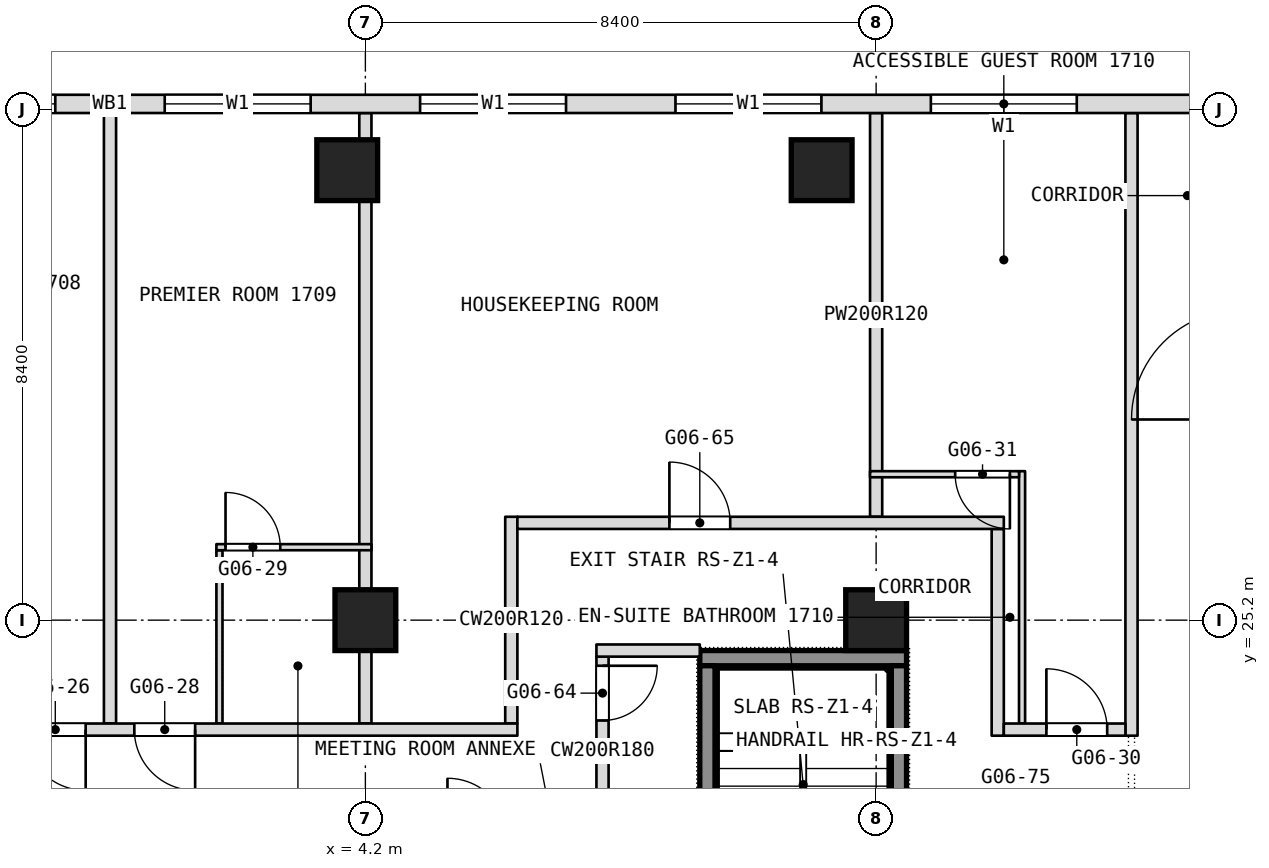
"""IFC4 building model, lengths in metres.
Left out: names, types, materials, properties, quantities, classifications, styles, units other than length and angle.
Written with IfcOpenShell. Run it as: python <this file> out.ifc"""

import sys

from ifc_helpers import new_model, si_unit, direction, frame, frame_2d, origin, origin_2d, place, context, subcontext, project, spatial, rectangle, extrude, element, fill, save


model = new_model("IFC4")
c1 = context("Model", 3, precision=1e-05, world=origin(), true_north=direction((0.0, 1.0)))
c2 = subcontext(c1, "Body", "Model", "MODEL_VIEW")
j1 = project(units=[si_unit("LENGTHUNIT", "METRE"), si_unit("PLANEANGLEUNIT", "RADIAN")], contexts=[c1])
p1 = place(None, origin())
s1 = spatial("IfcSite", under=j1, at=p1, CompositionType="ELEMENT")
p2 = place(p1, origin())
s2 = spatial("IfcBuilding", under=s1, at=p2, CompositionType="ELEMENT")
p3 = place(p2, frame((0.0, 0.0, 76.1)))
s3 = spatial("IfcBuildingStorey", under=s2, at=p3, CompositionType="ELEMENT", Elevation=76.1)
for number, where, z_axis, x_axis in (
    (1, (4.2, 25.2, 0.0), (0.0, 0.0, 1.0), (1.0, 0.0, 0.0)),
    (2, (12.6, 25.2, 0.0), (0.0, 0.0, 1.0), (1.0, 0.0, 0.0)),
    (3, (3.901, 32.6, 0.0), (0.0, 0.0, 1.0), (1.0, 0.0, 0.0)),
    (4, (11.704, 32.6, 0.0), (0.0, 0.0, 1.0), (1.0, 0.0, 0.0)),
):
    element("IfcColumn", number, at=place(p3, frame(where, z_axis=z_axis, x_axis=x_axis)), inside=s3, PredefinedType="COLUMN", context=c2, shape_type="SweptSolid", body=[
        extrude(rectangle(XDim=1.0, YDim=1.0, at=origin_2d()), origin(), (0.0, 0.0, 1.0), 3.6),
    ])
p4 = place(p3, frame((16.8, 23.3, 0.0), z_axis=(0.0, 0.0, 1.0), x_axis=(0.0, 1.0, 0.0)))
e5 = element("IfcWall", 5, at=p4, inside=s3, PredefinedType="PARTITIONING", context=c2, shape_type="SweptSolid", body=[
    extrude(rectangle(XDim=10.24, YDim=0.2, at=frame_2d((5.12, 0.0))), origin(), (0.0, 0.0, 1.0), 3.34),
])
p5 = place(p3, frame((15.0, 23.5, 0.0), z_axis=(0.0, 0.0, 1.0), x_axis=(0.0, 1.0, 0.0)))
e6 = element("IfcWall", 6, at=p5, inside=s3, PredefinedType="PARTITIONING", context=c2, shape_type="SweptSolid", body=[
    extrude(rectangle(XDim=4.15, YDim=0.1, at=frame_2d((2.075, 0.0))), origin(), (0.0, 0.0, 1.0), 3.34),
])
p6 = place(p3, frame((14.6, 23.3, 0.0), z_axis=(0.0, 0.0, 1.0), x_axis=(0.0, 1.0, 0.0)))
e7 = element("IfcWall", 7, at=p6, inside=s3, PredefinedType="PARTITIONING", context=c2, shape_type="SweptSolid", body=[
    extrude(rectangle(XDim=3.4, YDim=0.2, at=frame_2d((1.7, 0.0))), origin(), (0.0, 0.0, 1.0), 3.34),
])
p7 = place(p3, frame((12.6, 26.9, 0.0), z_axis=(0.0, 0.0, 1.0), x_axis=(0.0, 1.0, 0.0)))
e8 = element("IfcWall", 8, at=p7, inside=s3, PredefinedType="PARTITIONING", context=c2, shape_type="SweptSolid", body=[
    extrude(rectangle(XDim=6.64, YDim=0.2, at=frame_2d((3.32, 0.0))), origin(), (0.0, 0.0, 1.0), 3.34),
])
p8 = place(p3, frame((8.1, 21.5, 0.0), z_axis=(0.0, 0.0, 1.0), x_axis=(0.0, 1.0, 0.0)))
e9 = element("IfcWall", 9, at=p8, inside=s3, PredefinedType="PARTITIONING", context=c2, shape_type="SweptSolid", body=[
    extrude(rectangle(XDim=3.1, YDim=0.2, at=frame_2d((1.55, 0.0))), origin(), (0.0, 0.0, 1.0), 3.34),
])
p9 = place(p8, frame((2.05, 0.0, 0.0)))
e10 = element("IfcOpeningElement", 10, at=p9, cuts=e9, PredefinedType="OPENING", context=c2, shape_type="SweptSolid", body=[
    extrude(rectangle(XDim=0.9, YDim=2.1, at=frame_2d((0.45, 1.05))), frame((0.0, 0.1, 0.0), z_axis=(0.0, -1.0, 0.0), x_axis=(1.0, 0.0, 0.0)), (0.0, 0.0, 1.0), 0.2),
])
p10 = place(p3, frame((6.6, 23.5, 0.0), z_axis=(0.0, 0.0, 1.0), x_axis=(0.0, 1.0, 0.0)))
e11 = element("IfcWall", 11, at=p10, inside=s3, PredefinedType="PARTITIONING", context=c2, shape_type="SweptSolid", body=[
    extrude(rectangle(XDim=3.4, YDim=0.2, at=frame_2d((1.7, 0.0))), origin(), (0.0, 0.0, 1.0), 3.34),
])
p11 = place(p3, frame((4.2, 23.5, 0.0), z_axis=(0.0, 0.0, 1.0), x_axis=(0.0, 1.0, 0.0)))
e12 = element("IfcWall", 12, at=p11, inside=s3, PredefinedType="PARTITIONING", context=c2, shape_type="SweptSolid", body=[
    extrude(rectangle(XDim=10.04, YDim=0.2, at=frame_2d((5.02, 0.0))), origin(), (0.0, 0.0, 1.0), 3.34),
])
p12 = place(p3, frame((1.8, 23.5, 0.0), z_axis=(0.0, 0.0, 1.0), x_axis=(0.0, 1.0, 0.0)))
e13 = element("IfcWall", 13, at=p12, inside=s3, PredefinedType="PARTITIONING", context=c2, shape_type="SweptSolid", body=[
    extrude(rectangle(XDim=2.85, YDim=0.1, at=frame_2d((1.425, 0.0))), origin(), (0.0, 0.0, 1.0), 3.34),
])
p13 = place(p3, frame((0.0, 23.5, 0.0), z_axis=(0.0, 0.0, 1.0), x_axis=(0.0, 1.0, 0.0)))
e14 = element("IfcWall", 14, at=p13, inside=s3, PredefinedType="PARTITIONING", context=c2, shape_type="SweptSolid", body=[
    extrude(rectangle(XDim=10.04, YDim=0.2, at=frame_2d((5.02, 0.0))), origin(), (0.0, 0.0, 1.0), 3.34),
])
p14 = place(p3, frame((-16.7, 23.4, 0.0), z_axis=(0.0, 0.0, 1.0), x_axis=(1.0, 0.0, 0.0)))
e15 = element("IfcWall", 15, at=p14, inside=s3, PredefinedType="PARTITIONING", context=c2, shape_type="SweptSolid", body=[
    extrude(rectangle(XDim=23.4, YDim=0.2, at=frame_2d((11.7, 0.0))), origin(), (0.0, 0.0, 1.0), 3.34),
])
p15 = place(p14, frame((2.4, 0.0, 0.0)))
e16 = element("IfcOpeningElement", 16, at=p15, cuts=e15, PredefinedType="OPENING", context=c2, shape_type="SweptSolid", body=[
    extrude(rectangle(XDim=0.9, YDim=2.1, at=frame_2d((0.45, 1.05))), frame((0.0, 0.1, 0.0), z_axis=(0.0, -1.0, 0.0), x_axis=(1.0, 0.0, 0.0)), (0.0, 0.0, 1.0), 0.2),
])
p16 = place(p14, frame((5.65, 0.0, 0.0)))
e17 = element("IfcOpeningElement", 17, at=p16, cuts=e15, PredefinedType="OPENING", context=c2, shape_type="SweptSolid", body=[
    extrude(rectangle(XDim=1.1, YDim=2.1, at=frame_2d((0.55, 1.05))), frame((0.0, 0.1, 0.0), z_axis=(0.0, -1.0, 0.0), x_axis=(1.0, 0.0, 0.0)), (0.0, 0.0, 1.0), 0.2),
])
p17 = place(p14, frame((15.3, 0.0, 0.0)))
e18 = element("IfcOpeningElement", 18, at=p17, cuts=e15, PredefinedType="OPENING", context=c2, shape_type="SweptSolid", body=[
    extrude(rectangle(XDim=1.0, YDim=2.1, at=frame_2d((0.5, 1.05))), frame((0.0, 0.1, 0.0), z_axis=(0.0, -1.0, 0.0), x_axis=(1.0, 0.0, 0.0)), (0.0, 0.0, 1.0), 0.2),
])
p18 = place(p14, frame((17.1, 0.0, 0.0)))
e19 = element("IfcOpeningElement", 19, at=p18, cuts=e15, PredefinedType="OPENING", context=c2, shape_type="SweptSolid", body=[
    extrude(rectangle(XDim=1.0, YDim=2.1, at=frame_2d((0.5, 1.05))), frame((0.0, 0.1, 0.0), z_axis=(0.0, -1.0, 0.0), x_axis=(1.0, 0.0, 0.0)), (0.0, 0.0, 1.0), 0.2),
])
p19 = place(p3, frame((14.7, 23.4, 0.0), z_axis=(0.0, 0.0, 1.0), x_axis=(1.0, 0.0, 0.0)))
e20 = element("IfcWall", 20, at=p19, inside=s3, PredefinedType="PARTITIONING", context=c2, shape_type="SweptSolid", body=[
    extrude(rectangle(XDim=2.0, YDim=0.2, at=frame_2d((1.0, 0.0))), origin(), (0.0, 0.0, 1.0), 3.34),
])
p20 = place(p19, frame((0.7, 0.0, 0.0)))
e21 = element("IfcOpeningElement", 21, at=p20, cuts=e20, PredefinedType="OPENING", context=c2, shape_type="SweptSolid", body=[
    extrude(rectangle(XDim=1.0, YDim=2.1, at=frame_2d((0.5, 1.05))), frame((0.0, 0.1, 0.0), z_axis=(0.0, -1.0, 0.0), x_axis=(1.0, 0.0, 0.0)), (0.0, 0.0, 1.0), 0.2),
])
p21 = place(p3, frame((8.0, 24.7, 0.0), z_axis=(0.0, 0.0, 1.0), x_axis=(1.0, 0.0, 0.0)))
e22 = element("IfcWall", 22, at=p21, inside=s3, PredefinedType="PARTITIONING", context=c2, shape_type="SweptSolid", body=[
    extrude(rectangle(XDim=1.7, YDim=0.2, at=frame_2d((0.85, 0.0))), origin(), (0.0, 0.0, 1.0), 3.34),
])
p22 = place(p3, frame((1.75, 26.4, 0.0), z_axis=(0.0, 0.0, 1.0), x_axis=(1.0, 0.0, 0.0)))
e23 = element("IfcWall", 23, at=p22, inside=s3, PredefinedType="PARTITIONING", context=c2, shape_type="SweptSolid", body=[
    extrude(rectangle(XDim=2.55, YDim=0.1, at=frame_2d((1.275, 0.0))), origin(), (0.0, 0.0, 1.0), 3.34),
])
p23 = place(p22, frame((0.15, 0.0, 0.0)))
e24 = element("IfcOpeningElement", 24, at=p23, cuts=e23, PredefinedType="OPENING", context=c2, shape_type="SweptSolid", body=[
    extrude(rectangle(XDim=0.9, YDim=2.1, at=frame_2d((0.45, 1.05))), frame((0.0, 0.05, 0.0), z_axis=(0.0, -1.0, 0.0), x_axis=(1.0, 0.0, 0.0)), (0.0, 0.0, 1.0), 0.1),
])
p24 = place(p3, frame((6.7, 26.8, 0.0), z_axis=(0.0, 0.0, 1.0), x_axis=(1.0, 0.0, 0.0)))
e25 = element("IfcWall", 25, at=p24, inside=s3, PredefinedType="PARTITIONING", context=c2, shape_type="SweptSolid", body=[
    extrude(rectangle(XDim=8.0, YDim=0.2, at=frame_2d((4.0, 0.0))), origin(), (0.0, 0.0, 1.0), 3.34),
])
p25 = place(p24, frame((2.5, 0.0, 0.0)))
e26 = element("IfcOpeningElement", 26, at=p25, cuts=e25, PredefinedType="OPENING", context=c2, shape_type="SweptSolid", body=[
    extrude(rectangle(XDim=1.0, YDim=2.1, at=frame_2d((0.5, 1.05))), frame((0.0, 0.1, 0.0), z_axis=(0.0, -1.0, 0.0), x_axis=(1.0, 0.0, 0.0)), (0.0, 0.0, 1.0), 0.2),
])
p26 = place(p3, frame((12.5, 27.6, 0.0), z_axis=(0.0, 0.0, 1.0), x_axis=(1.0, 0.0, 0.0)))
e27 = element("IfcWall", 27, at=p26, inside=s3, PredefinedType="PARTITIONING", context=c2, shape_type="SweptSolid", body=[
    extrude(rectangle(XDim=2.45, YDim=0.1, at=frame_2d((1.225, 0.0))), origin(), (0.0, 0.0, 1.0), 3.34),
])
p27 = place(p26, frame((1.4, 0.0, 0.0)))
e28 = element("IfcOpeningElement", 28, at=p27, cuts=e27, PredefinedType="OPENING", context=c2, shape_type="SweptSolid", body=[
    extrude(rectangle(XDim=0.9, YDim=2.1, at=frame_2d((0.45, 1.05))), frame((0.0, 0.05, 0.0), z_axis=(0.0, -1.0, 0.0), x_axis=(1.0, 0.0, 0.0)), (0.0, 0.0, 1.0), 0.1),
])
p28 = place(p3, frame((23.406, 33.69, 0.0), z_axis=(0.0, 0.0, 1.0), x_axis=(-1.0, 0.0, 0.0)))
e29 = element("IfcWall", 29, at=p28, inside=s3, PredefinedType="NOTDEFINED", context=c2, shape_type="SweptSolid", body=[
    extrude(rectangle(XDim=46.812, YDim=0.3, at=frame_2d((23.406, 0.0))), origin(), (0.0, 0.0, 1.0), 3.6),
])
p29 = place(p28, frame((2.186, 0.0, 0.9)))
e30 = element("IfcOpeningElement", 30, at=p29, cuts=e29, PredefinedType="OPENING", context=c2, shape_type="SweptSolid", body=[
    extrude(rectangle(XDim=2.4, YDim=2.1, at=frame_2d((1.2, 1.05))), frame((0.0, 0.15, 0.0), z_axis=(0.0, -1.0, 0.0), x_axis=(1.0, 0.0, 0.0)), (0.0, 0.0, 1.0), 0.3),
])
p30 = place(p28, frame((7.506, 0.0, 0.9)))
e31 = element("IfcOpeningElement", 31, at=p30, cuts=e29, PredefinedType="OPENING", context=c2, shape_type="SweptSolid", body=[
    extrude(rectangle(XDim=2.4, YDim=2.1, at=frame_2d((1.2, 1.05))), frame((0.0, 0.15, 0.0), z_axis=(0.0, -1.0, 0.0), x_axis=(1.0, 0.0, 0.0)), (0.0, 0.0, 1.0), 0.3),
])
p31 = place(p28, frame((11.706, 0.0, 0.9)))
e32 = element("IfcOpeningElement", 32, at=p31, cuts=e29, PredefinedType="OPENING", context=c2, shape_type="SweptSolid", body=[
    extrude(rectangle(XDim=2.4, YDim=2.1, at=frame_2d((1.2, 1.05))), frame((0.0, 0.15, 0.0), z_axis=(0.0, -1.0, 0.0), x_axis=(1.0, 0.0, 0.0)), (0.0, 0.0, 1.0), 0.3),
])
p32 = place(p28, frame((15.906, 0.0, 0.9)))
e33 = element("IfcOpeningElement", 33, at=p32, cuts=e29, PredefinedType="OPENING", context=c2, shape_type="SweptSolid", body=[
    extrude(rectangle(XDim=2.4, YDim=2.1, at=frame_2d((1.2, 1.05))), frame((0.0, 0.15, 0.0), z_axis=(0.0, -1.0, 0.0), x_axis=(1.0, 0.0, 0.0)), (0.0, 0.0, 1.0), 0.3),
])
p33 = place(p28, frame((20.106, 0.0, 0.9)))
e34 = element("IfcOpeningElement", 34, at=p33, cuts=e29, PredefinedType="OPENING", context=c2, shape_type="SweptSolid", body=[
    extrude(rectangle(XDim=2.4, YDim=2.1, at=frame_2d((1.2, 1.05))), frame((0.0, 0.15, 0.0), z_axis=(0.0, -1.0, 0.0), x_axis=(1.0, 0.0, 0.0)), (0.0, 0.0, 1.0), 0.3),
])
p34 = place(p28, frame((24.306, 0.0, 0.9)))
e35 = element("IfcOpeningElement", 35, at=p34, cuts=e29, PredefinedType="OPENING", context=c2, shape_type="SweptSolid", body=[
    extrude(rectangle(XDim=2.4, YDim=2.1, at=frame_2d((1.2, 1.05))), frame((0.0, 0.15, 0.0), z_axis=(0.0, -1.0, 0.0), x_axis=(1.0, 0.0, 0.0)), (0.0, 0.0, 1.0), 0.3),
])
p35 = place(p28, frame((28.506, 0.0, 0.9)))
e36 = element("IfcOpeningElement", 36, at=p35, cuts=e29, PredefinedType="OPENING", context=c2, shape_type="SweptSolid", body=[
    extrude(rectangle(XDim=2.4, YDim=2.1, at=frame_2d((1.2, 1.05))), frame((0.0, 0.15, 0.0), z_axis=(0.0, -1.0, 0.0), x_axis=(1.0, 0.0, 0.0)), (0.0, 0.0, 1.0), 0.3),
])
p36 = place(p28, frame((32.706, 0.0, 0.9)))
e37 = element("IfcOpeningElement", 37, at=p36, cuts=e29, PredefinedType="OPENING", context=c2, shape_type="SweptSolid", body=[
    extrude(rectangle(XDim=2.4, YDim=2.1, at=frame_2d((1.2, 1.05))), frame((0.0, 0.15, 0.0), z_axis=(0.0, -1.0, 0.0), x_axis=(1.0, 0.0, 0.0)), (0.0, 0.0, 1.0), 0.3),
])
p37 = place(p28, frame((36.906, 0.0, 0.9)))
e38 = element("IfcOpeningElement", 38, at=p37, cuts=e29, PredefinedType="OPENING", context=c2, shape_type="SweptSolid", body=[
    extrude(rectangle(XDim=2.4, YDim=2.1, at=frame_2d((1.2, 1.05))), frame((0.0, 0.15, 0.0), z_axis=(0.0, -1.0, 0.0), x_axis=(1.0, 0.0, 0.0)), (0.0, 0.0, 1.0), 0.3),
])
p38 = place(p28, frame((42.226, 0.0, 0.9)))
e39 = element("IfcOpeningElement", 39, at=p38, cuts=e29, PredefinedType="OPENING", context=c2, shape_type="SweptSolid", body=[
    extrude(rectangle(XDim=2.4, YDim=2.1, at=frame_2d((1.2, 1.05))), frame((0.0, 0.15, 0.0), z_axis=(0.0, -1.0, 0.0), x_axis=(1.0, 0.0, 0.0)), (0.0, 0.0, 1.0), 0.3),
])
p39 = place(p3, frame((9.7, 24.575, 0.1), z_axis=(0.0, 0.0, 1.0), x_axis=(1.0, 0.0, 0.0)))
e40 = element("IfcWall", 40, at=p39, inside=s3, PredefinedType="SHEAR", context=c2, shape_type="SweptSolid", body=[
    extrude(rectangle(XDim=3.4, YDim=0.25, at=frame_2d((1.7, 0.0))), origin(), (0.0, 0.0, 1.0), 3.6),
])
p40 = place(p3, frame((9.825, 18.75, 0.1), z_axis=(0.0, 0.0, 1.0), x_axis=(0.0, 1.0, 0.0)))
e41 = element("IfcWall", 41, at=p40, inside=s3, PredefinedType="SHEAR", context=c2, shape_type="SweptSolid", body=[
    extrude(rectangle(XDim=5.7, YDim=0.25, at=frame_2d((2.85, 0.0))), origin(), (0.0, 0.0, 1.0), 3.6),
])
p41 = place(p40, frame((0.2, 0.0, 0.0)))
e42 = element("IfcOpeningElement", 42, at=p41, cuts=e41, PredefinedType="OPENING", context=c2, shape_type="SweptSolid", body=[
    extrude(rectangle(XDim=1.0, YDim=2.1, at=frame_2d((0.5, 1.05))), frame((0.0, 0.125, 0.0), z_axis=(0.0, -1.0, 0.0), x_axis=(1.0, 0.0, 0.0)), (0.0, 0.0, 1.0), 0.25),
])
p42 = place(p3, frame((12.975, 18.75, 0.1), z_axis=(0.0, 0.0, 1.0), x_axis=(0.0, 1.0, 0.0)))
e43 = element("IfcWall", 43, at=p42, inside=s3, PredefinedType="SHEAR", context=c2, shape_type="SweptSolid", body=[
    extrude(rectangle(XDim=5.7, YDim=0.25, at=frame_2d((2.85, 0.0))), origin(), (0.0, 0.0, 1.0), 3.6),
])
p43 = place(p9, origin())
e44 = element("IfcDoor", 44, at=p43, inside=s3, OperationType="SINGLE_SWING_LEFT", PredefinedType="DOOR", context=c2, shape_type="SweptSolid", body=[
    extrude(rectangle(XDim=0.9, YDim=2.1, at=frame_2d((0.45, 1.05))), frame((0.0, 0.025, 0.0), z_axis=(0.0, -1.0, 0.0), x_axis=(1.0, 0.0, 0.0)), (0.0, 0.0, 1.0), 0.05),
])
fill(e10, e44)
p44 = place(p17, origin())
e45 = element("IfcDoor", 45, at=p44, inside=s3, OperationType="SINGLE_SWING_LEFT", PredefinedType="DOOR", context=c2, shape_type="SweptSolid", body=[
    extrude(rectangle(XDim=1.0, YDim=2.1, at=frame_2d((0.5, 1.05))), frame((0.0, 0.025, 0.0), z_axis=(0.0, -1.0, 0.0), x_axis=(1.0, 0.0, 0.0)), (0.0, 0.0, 1.0), 0.05),
])
fill(e18, e45)
p45 = place(p18, origin())
e46 = element("IfcDoor", 46, at=p45, inside=s3, OperationType="SINGLE_SWING_LEFT", PredefinedType="DOOR", context=c2, shape_type="SweptSolid", body=[
    extrude(rectangle(XDim=1.0, YDim=2.1, at=frame_2d((0.5, 1.05))), frame((0.0, 0.025, 0.0), z_axis=(0.0, -1.0, 0.0), x_axis=(1.0, 0.0, 0.0)), (0.0, 0.0, 1.0), 0.05),
])
fill(e19, e46)
p46 = place(p20, origin())
e47 = element("IfcDoor", 47, at=p46, inside=s3, OperationType="SINGLE_SWING_RIGHT", PredefinedType="DOOR", context=c2, shape_type="SweptSolid", body=[
    extrude(rectangle(XDim=1.0, YDim=2.1, at=frame_2d((0.5, 1.05))), frame((0.0, 0.025, 0.0), z_axis=(0.0, -1.0, 0.0), x_axis=(1.0, 0.0, 0.0)), (0.0, 0.0, 1.0), 0.05),
])
fill(e21, e47)
p47 = place(p23, origin())
e48 = element("IfcDoor", 48, at=p47, inside=s3, OperationType="SINGLE_SWING_RIGHT", PredefinedType="DOOR", context=c2, shape_type="SweptSolid", body=[
    extrude(rectangle(XDim=0.9, YDim=2.1, at=frame_2d((0.45, 1.05))), frame((0.0, 0.025, 0.0), z_axis=(0.0, -1.0, 0.0), x_axis=(1.0, 0.0, 0.0)), (0.0, 0.0, 1.0), 0.05),
])
fill(e24, e48)
p48 = place(p25, origin())
e49 = element("IfcDoor", 49, at=p48, inside=s3, OperationType="SINGLE_SWING_LEFT", PredefinedType="DOOR", context=c2, shape_type="SweptSolid", body=[
    extrude(rectangle(XDim=1.0, YDim=2.1, at=frame_2d((0.5, 1.05))), frame((0.0, 0.025, 0.0), z_axis=(0.0, -1.0, 0.0), x_axis=(1.0, 0.0, 0.0)), (0.0, 0.0, 1.0), 0.05),
])
fill(e26, e49)
p49 = place(p27, origin())
e50 = element("IfcDoor", 50, at=p49, inside=s3, OperationType="SINGLE_SWING_LEFT", PredefinedType="DOOR", context=c2, shape_type="SweptSolid", body=[
    extrude(rectangle(XDim=0.9, YDim=2.1, at=frame_2d((0.45, 1.05))), frame((0.0, 0.025, 0.0), z_axis=(0.0, -1.0, 0.0), x_axis=(1.0, 0.0, 0.0)), (0.0, 0.0, 1.0), 0.05),
])
fill(e28, e50)
p50 = place(p30, origin())
e51 = element("IfcWindow", 51, at=p50, inside=s3, PartitioningType="SINGLE_PANEL", PredefinedType="WINDOW", context=c2, shape_type="SweptSolid", body=[
    extrude(rectangle(XDim=2.4, YDim=2.1, at=frame_2d((1.2, 1.05))), frame((0.0, 0.03, 0.0), z_axis=(0.0, -1.0, 0.0), x_axis=(1.0, 0.0, 0.0)), (0.0, 0.0, 1.0), 0.06),
])
fill(e31, e51)
p51 = place(p31, origin())
e52 = element("IfcWindow", 52, at=p51, inside=s3, PartitioningType="SINGLE_PANEL", PredefinedType="WINDOW", context=c2, shape_type="SweptSolid", body=[
    extrude(rectangle(XDim=2.4, YDim=2.1, at=frame_2d((1.2, 1.05))), frame((0.0, 0.03, 0.0), z_axis=(0.0, -1.0, 0.0), x_axis=(1.0, 0.0, 0.0)), (0.0, 0.0, 1.0), 0.06),
])
fill(e32, e52)
p52 = place(p32, origin())
e53 = element("IfcWindow", 53, at=p52, inside=s3, PartitioningType="SINGLE_PANEL", PredefinedType="WINDOW", context=c2, shape_type="SweptSolid", body=[
    extrude(rectangle(XDim=2.4, YDim=2.1, at=frame_2d((1.2, 1.05))), frame((0.0, 0.03, 0.0), z_axis=(0.0, -1.0, 0.0), x_axis=(1.0, 0.0, 0.0)), (0.0, 0.0, 1.0), 0.06),
])
fill(e33, e53)
p53 = place(p33, origin())
e54 = element("IfcWindow", 54, at=p53, inside=s3, PartitioningType="SINGLE_PANEL", PredefinedType="WINDOW", context=c2, shape_type="SweptSolid", body=[
    extrude(rectangle(XDim=2.4, YDim=2.1, at=frame_2d((1.2, 1.05))), frame((0.0, 0.03, 0.0), z_axis=(0.0, -1.0, 0.0), x_axis=(1.0, 0.0, 0.0)), (0.0, 0.0, 1.0), 0.06),
])
fill(e34, e54)
p54 = place(p34, origin())
e55 = element("IfcWindow", 55, at=p54, inside=s3, PartitioningType="SINGLE_PANEL", PredefinedType="WINDOW", context=c2, shape_type="SweptSolid", body=[
    extrude(rectangle(XDim=2.4, YDim=2.1, at=frame_2d((1.2, 1.05))), frame((0.0, 0.03, 0.0), z_axis=(0.0, -1.0, 0.0), x_axis=(1.0, 0.0, 0.0)), (0.0, 0.0, 1.0), 0.06),
])
fill(e35, e55)
save(model, sys.argv[1])
